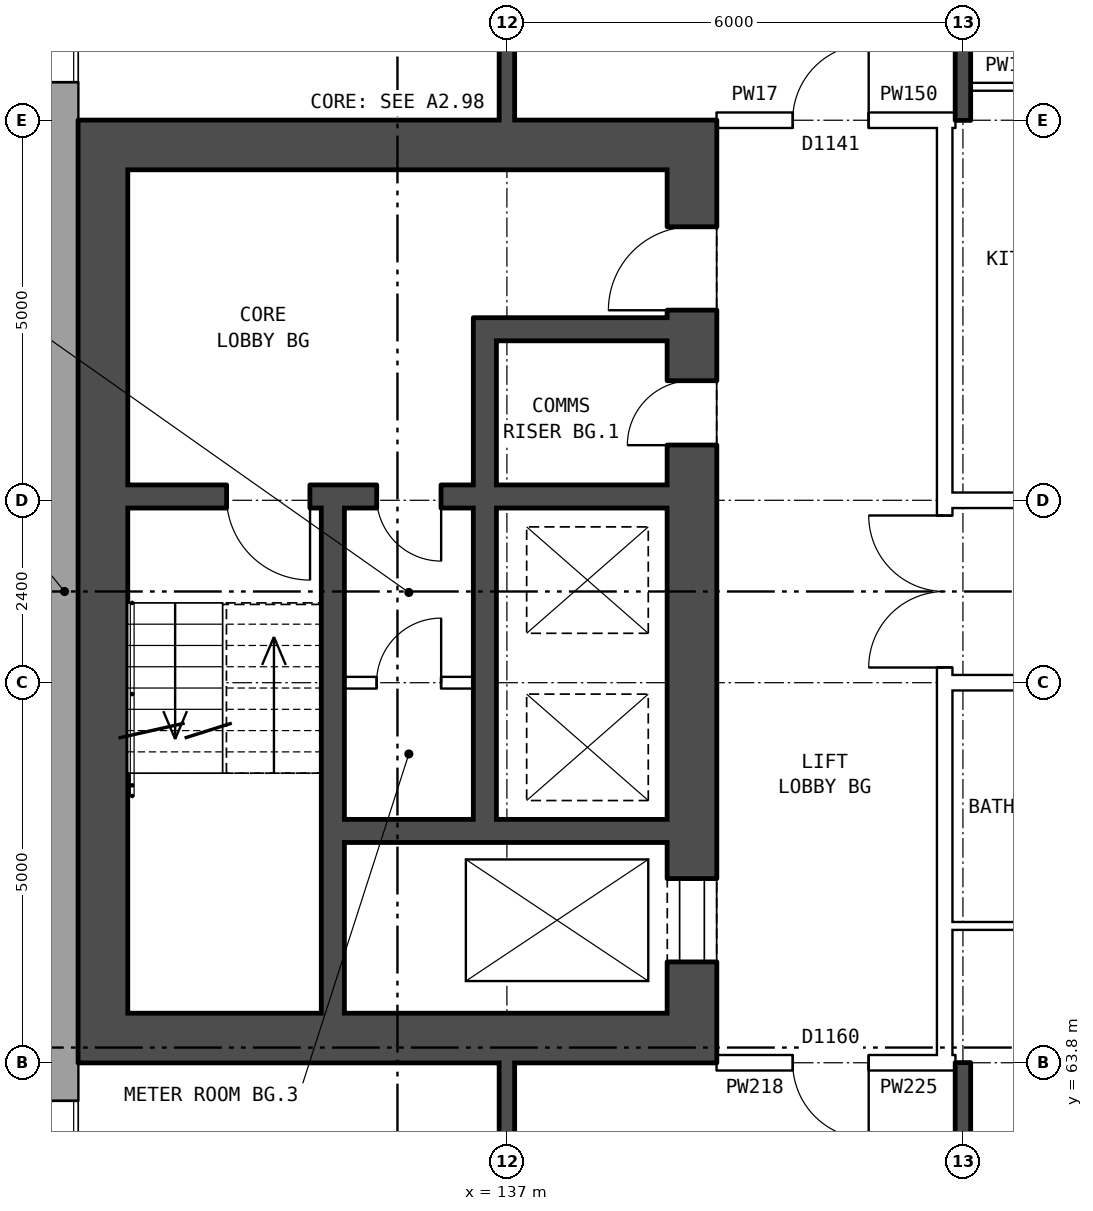
"""IFC4 building model, lengths in metres.
Left out: names, types, materials, properties, quantities, classifications, styles, units other than length and angle.
Written with IfcOpenShell. Run it as: python <this file> out.ifc"""

import sys

from ifc_helpers import new_model, si_unit, direction, frame, frame_2d, origin, place, context, subcontext, project, spatial, rectangle, extrude, element, fill, save


model = new_model("IFC4")
c1 = context("Model", 3, precision=1e-05, world=origin(), true_north=direction((0.0, 1.0)))
c2 = subcontext(c1, "Body", "Model", "MODEL_VIEW")
j1 = project(units=[si_unit("LENGTHUNIT", "METRE"), si_unit("PLANEANGLEUNIT", "RADIAN")], contexts=[c1])
p1 = place(None, origin())
s1 = spatial("IfcSite", under=j1, at=p1, CompositionType="ELEMENT")
p2 = place(p1, origin())
s2 = spatial("IfcBuilding", under=s1, at=p2, CompositionType="ELEMENT")
p3 = place(p2, frame((0.0, 0.0, 102.6)))
s3 = spatial("IfcBuildingStorey", under=s2, at=p3, CompositionType="ELEMENT", Elevation=102.6)
p4 = place(p3, frame((131.18, 82.925, 0.0), z_axis=(0.0, 0.0, 1.0), x_axis=(0.0, -1.0, 0.0)))
e1 = element("IfcWall", 1, at=p4, inside=s3, PredefinedType="STANDARD", context=c2, shape_type="SweptSolid", body=[
    extrude(rectangle(XDim=25.851, YDim=0.36, at=frame_2d((12.925, 0.0))), origin(), (0.0, 0.0, 1.0), 2.85),
])
p5 = place(p4, frame((1.625, 0.0, 0.8)))
e2 = element("IfcOpeningElement", 2, at=p5, cuts=e1, PredefinedType="OPENING", context=c2, shape_type="SweptSolid", body=[
    extrude(rectangle(XDim=1.6, YDim=1.8, at=frame_2d((0.8, 0.9))), frame((0.0, 0.19, 0.0), z_axis=(0.0, -1.0, 0.0), x_axis=(1.0, 0.0, 0.0)), (0.0, 0.0, 1.0), 0.38),
])
p6 = place(p4, frame((4.625, 0.0, 0.8)))
e3 = element("IfcOpeningElement", 3, at=p6, cuts=e1, PredefinedType="OPENING", context=c2, shape_type="SweptSolid", body=[
    extrude(rectangle(XDim=1.6, YDim=1.8, at=frame_2d((0.8, 0.9))), frame((0.0, 0.19, 0.0), z_axis=(0.0, -1.0, 0.0), x_axis=(1.0, 0.0, 0.0)), (0.0, 0.0, 1.0), 0.38),
])
p7 = place(p4, frame((19.625, 0.0, 0.8)))
e4 = element("IfcOpeningElement", 4, at=p7, cuts=e1, PredefinedType="OPENING", context=c2, shape_type="SweptSolid", body=[
    extrude(rectangle(XDim=1.6, YDim=1.8, at=frame_2d((0.8, 0.9))), frame((0.0, 0.19, 0.0), z_axis=(0.0, -1.0, 0.0), x_axis=(1.0, 0.0, 0.0)), (0.0, 0.0, 1.0), 0.38),
])
p8 = place(p4, frame((22.625, 0.0, 0.8)))
e5 = element("IfcOpeningElement", 5, at=p8, cuts=e1, PredefinedType="OPENING", context=c2, shape_type="SweptSolid", body=[
    extrude(rectangle(XDim=1.6, YDim=1.8, at=frame_2d((0.8, 0.9))), frame((0.0, 0.19, 0.0), z_axis=(0.0, -1.0, 0.0), x_axis=(1.0, 0.0, 0.0)), (0.0, 0.0, 1.0), 0.38),
])
p9 = place(p3, frame((139.435, 64.45, 0.0), z_axis=(0.0, 0.0, 1.0), x_axis=(0.0, 1.0, 0.0)))
e6 = element("IfcWall", 6, at=p9, inside=s3, PredefinedType="SHEAR", context=c2, shape_type="SweptSolid", body=[
    extrude(rectangle(XDim=11.1, YDim=0.65, at=frame_2d((5.55, 0.0))), origin(), (0.0, 0.0, 1.0), 2.85),
])
p10 = place(p9, frame((0.675, 0.0, 0.0)))
e7 = element("IfcOpeningElement", 7, at=p10, cuts=e6, PredefinedType="OPENING", context=c2, shape_type="SweptSolid", body=[
    extrude(rectangle(XDim=1.1, YDim=2.1, at=frame_2d((0.55, 1.05))), frame((0.0, 0.335, 0.0), z_axis=(0.0, -1.0, 0.0), x_axis=(1.0, 0.0, 0.0)), (0.0, 0.0, 1.0), 0.67),
])
p11 = place(p9, frame((9.25, 0.0, 0.0)))
e8 = element("IfcOpeningElement", 8, at=p11, cuts=e6, PredefinedType="OPENING", context=c2, shape_type="SweptSolid", body=[
    extrude(rectangle(XDim=1.1, YDim=2.1, at=frame_2d((0.55, 1.05))), frame((0.0, 0.335, 0.0), z_axis=(0.0, -1.0, 0.0), x_axis=(1.0, 0.0, 0.0)), (0.0, 0.0, 1.0), 0.67),
])
p12 = place(p9, frame((7.475, 0.0, 0.0)))
e9 = element("IfcOpeningElement", 9, at=p12, cuts=e6, PredefinedType="OPENING", context=c2, shape_type="SweptSolid", body=[
    extrude(rectangle(XDim=0.85, YDim=2.1, at=frame_2d((0.425, 1.05))), frame((0.0, 0.335, 0.0), z_axis=(0.0, -1.0, 0.0), x_axis=(1.0, 0.0, 0.0)), (0.0, 0.0, 1.0), 0.67),
])
p13 = place(p3, frame((131.685, 64.45, 0.0), z_axis=(0.0, 0.0, 1.0), x_axis=(0.0, 1.0, 0.0)))
e10 = element("IfcWall", 10, at=p13, inside=s3, PredefinedType="SHEAR", context=c2, shape_type="SweptSolid", body=[
    extrude(rectangle(XDim=11.1, YDim=0.65, at=frame_2d((5.55, 0.0))), origin(), (0.0, 0.0, 1.0), 2.85),
])
for number, where, z_axis, x_axis in (
    (11, (139.76, 64.125, 0.0), (0.0, 0.0, 1.0), (-1.0, 0.0, 0.0)),
    (12, (139.76, 75.875, 0.0), (0.0, 0.0, 1.0), (-1.0, 0.0, 0.0)),
):
    element("IfcWall", number, at=place(p3, frame(where, z_axis=z_axis, x_axis=x_axis)), inside=s3, PredefinedType="SHEAR", context=c2, shape_type="SweptSolid", body=[
        extrude(rectangle(XDim=8.4, YDim=0.65, at=frame_2d((4.2, 0.0))), origin(), (0.0, 0.0, 1.0), 2.85),
    ])
p14 = place(p3, frame((139.11, 66.85, 0.0), z_axis=(0.0, 0.0, 1.0), x_axis=(-1.0, 0.0, 0.0)))
e13 = element("IfcWall", 13, at=p14, inside=s3, PredefinedType="SHEAR", context=c2, shape_type="SweptSolid", body=[
    extrude(rectangle(XDim=4.25, YDim=0.3, at=frame_2d((2.125, 0.0))), origin(), (0.0, 0.0, 1.0), 2.85),
])
p15 = place(p3, frame((136.56, 68.8, 0.0), z_axis=(0.0, 0.0, 1.0), x_axis=(-1.0, 0.0, 0.0)))
e14 = element("IfcWall", 14, at=p15, inside=s3, PredefinedType="PARTITIONING", context=c2, shape_type="SweptSolid", body=[
    extrude(rectangle(XDim=1.7, YDim=0.15, at=frame_2d((0.85, 0.0))), origin(), (0.0, 0.0, 1.0), 2.85),
])
p16 = place(p15, frame((0.425, 0.0, 0.0)))
e15 = element("IfcOpeningElement", 15, at=p16, cuts=e14, PredefinedType="OPENING", context=c2, shape_type="SweptSolid", body=[
    extrude(rectangle(XDim=0.85, YDim=2.1, at=frame_2d((0.425, 1.05))), frame((0.0, 0.085, 0.0), z_axis=(0.0, -1.0, 0.0), x_axis=(1.0, 0.0, 0.0)), (0.0, 0.0, 1.0), 0.17),
])
p17 = place(p3, frame((139.11, 71.25, 0.0), z_axis=(0.0, 0.0, 1.0), x_axis=(-1.0, 0.0, 0.0)))
e16 = element("IfcWall", 16, at=p17, inside=s3, PredefinedType="SHEAR", context=c2, shape_type="SweptSolid", body=[
    extrude(rectangle(XDim=7.1, YDim=0.3, at=frame_2d((3.55, 0.0))), origin(), (0.0, 0.0, 1.0), 2.85),
])
p18 = place(p17, frame((4.7, 0.0, 0.0)))
e17 = element("IfcOpeningElement", 17, at=p18, cuts=e16, PredefinedType="OPENING", context=c2, shape_type="SweptSolid", body=[
    extrude(rectangle(XDim=1.1, YDim=2.1, at=frame_2d((0.55, 1.05))), frame((0.0, 0.16, 0.0), z_axis=(0.0, -1.0, 0.0), x_axis=(1.0, 0.0, 0.0)), (0.0, 0.0, 1.0), 0.32),
])
p19 = place(p17, frame((2.975, 0.0, 0.0)))
e18 = element("IfcOpeningElement", 18, at=p19, cuts=e16, PredefinedType="OPENING", context=c2, shape_type="SweptSolid", body=[
    extrude(rectangle(XDim=0.85, YDim=2.1, at=frame_2d((0.425, 1.05))), frame((0.0, 0.16, 0.0), z_axis=(0.0, -1.0, 0.0), x_axis=(1.0, 0.0, 0.0)), (0.0, 0.0, 1.0), 0.32),
])
p20 = place(p3, frame((139.11, 73.45, 0.0), z_axis=(0.0, 0.0, 1.0), x_axis=(-1.0, 0.0, 0.0)))
e19 = element("IfcWall", 19, at=p20, inside=s3, PredefinedType="SHEAR", context=c2, shape_type="SweptSolid", body=[
    extrude(rectangle(XDim=2.25, YDim=0.3, at=frame_2d((1.125, 0.0))), origin(), (0.0, 0.0, 1.0), 2.85),
])
p21 = place(p3, frame((136.71, 67.0, 0.0), z_axis=(0.0, 0.0, 1.0), x_axis=(0.0, 1.0, 0.0)))
e20 = element("IfcWall", 20, at=p21, inside=s3, PredefinedType="SHEAR", context=c2, shape_type="SweptSolid", body=[
    extrude(rectangle(XDim=4.1, YDim=0.3, at=frame_2d((2.05, 0.0))), origin(), (0.0, 0.0, 1.0), 2.85),
])
p22 = place(p3, frame((136.71, 71.4, 0.0), z_axis=(0.0, 0.0, 1.0), x_axis=(0.0, 1.0, 0.0)))
e21 = element("IfcWall", 21, at=p22, inside=s3, PredefinedType="SHEAR", context=c2, shape_type="SweptSolid", body=[
    extrude(rectangle(XDim=2.2, YDim=0.3, at=frame_2d((1.1, 0.0))), origin(), (0.0, 0.0, 1.0), 2.85),
])
p23 = place(p3, frame((134.71, 64.45, 0.0), z_axis=(0.0, 0.0, 1.0), x_axis=(0.0, 1.0, 0.0)))
e22 = element("IfcWall", 22, at=p23, inside=s3, PredefinedType="SHEAR", context=c2, shape_type="SweptSolid", body=[
    extrude(rectangle(XDim=6.65, YDim=0.3, at=frame_2d((3.325, 0.0))), origin(), (0.0, 0.0, 1.0), 2.85),
])
p24 = place(p3, frame((142.76, 63.9, 0.0), z_axis=(0.0, 0.0, 1.0), x_axis=(0.0, 1.0, 0.0)))
e23 = element("IfcWall", 23, at=p24, inside=s3, PredefinedType="PARTITIONING", context=c2, shape_type="SweptSolid", body=[
    extrude(rectangle(XDim=12.2, YDim=0.2, at=frame_2d((6.1, 0.0))), origin(), (0.0, 0.0, 1.0), 2.85),
])
p25 = place(p24, frame((5.1, 0.0, 0.0)))
e24 = element("IfcOpeningElement", 24, at=p25, cuts=e23, PredefinedType="OPENING", context=c2, shape_type="SweptSolid", body=[
    extrude(rectangle(XDim=2.0, YDim=2.1, at=frame_2d((1.0, 1.05))), frame((0.0, 0.11, 0.0), z_axis=(0.0, -1.0, 0.0), x_axis=(1.0, 0.0, 0.0)), (0.0, 0.0, 1.0), 0.22),
])
p26 = place(p3, frame((139.76, 63.8, 0.0), z_axis=(0.0, 0.0, 1.0), x_axis=(1.0, 0.0, 0.0)))
e25 = element("IfcWall", 25, at=p26, inside=s3, PredefinedType="PARTITIONING", context=c2, shape_type="SweptSolid", body=[
    extrude(rectangle(XDim=3.0, YDim=0.2, at=frame_2d((1.5, 0.0))), origin(), (0.0, 0.0, 1.0), 2.85),
])
p27 = place(p26, frame((1.0, 0.0, 0.0)))
e26 = element("IfcOpeningElement", 26, at=p27, cuts=e25, PredefinedType="OPENING", context=c2, shape_type="SweptSolid", body=[
    extrude(rectangle(XDim=1.0, YDim=2.1, at=frame_2d((0.5, 1.05))), frame((0.0, 0.11, 0.0), z_axis=(0.0, -1.0, 0.0), x_axis=(1.0, 0.0, 0.0)), (0.0, 0.0, 1.0), 0.22),
])
p28 = place(p3, frame((142.76, 63.8, 0.0), z_axis=(0.0, 0.0, 1.0), x_axis=(1.0, 0.0, 0.0)))
e27 = element("IfcWall", 27, at=p28, inside=s3, PredefinedType="PARTITIONING", context=c2, shape_type="SweptSolid", body=[
    extrude(rectangle(XDim=0.14, YDim=0.2, at=frame_2d((0.07, 0.0))), origin(), (0.0, 0.0, 1.0), 2.85),
])
p29 = place(p3, frame((142.76, 65.6, 0.0), z_axis=(0.0, 0.0, 1.0), x_axis=(1.0, 0.0, 0.0)))
e28 = element("IfcWall", 28, at=p29, inside=s3, PredefinedType="PARTITIONING", context=c2, shape_type="SweptSolid", body=[
    extrude(rectangle(XDim=3.24, YDim=0.1, at=frame_2d((1.62, 0.0))), origin(), (0.0, 0.0, 1.0), 2.85),
])
p30 = place(p3, frame((142.76, 68.8, 0.0), z_axis=(0.0, 0.0, 1.0), x_axis=(1.0, 0.0, 0.0)))
e29 = element("IfcWall", 29, at=p30, inside=s3, PredefinedType="PARTITIONING", context=c2, shape_type="SweptSolid", body=[
    extrude(rectangle(XDim=14.48, YDim=0.2, at=frame_2d((7.24, 0.0))), origin(), (0.0, 0.0, 1.0), 2.85),
])
p31 = place(p30, frame((4.24, 0.0, 0.0)))
e30 = element("IfcOpeningElement", 30, at=p31, cuts=e29, PredefinedType="OPENING", context=c2, shape_type="SweptSolid", body=[
    extrude(rectangle(XDim=1.0, YDim=2.1, at=frame_2d((0.5, 1.05))), frame((0.0, 0.11, 0.0), z_axis=(0.0, -1.0, 0.0), x_axis=(1.0, 0.0, 0.0)), (0.0, 0.0, 1.0), 0.22),
])
p32 = place(p30, frame((7.24, 0.0, 0.0)))
e31 = element("IfcOpeningElement", 31, at=p32, cuts=e29, PredefinedType="OPENING", context=c2, shape_type="SweptSolid", body=[
    extrude(rectangle(XDim=1.0, YDim=2.1, at=frame_2d((0.5, 1.05))), frame((0.0, 0.11, 0.0), z_axis=(0.0, -1.0, 0.0), x_axis=(1.0, 0.0, 0.0)), (0.0, 0.0, 1.0), 0.22),
])
p33 = place(p3, frame((142.76, 71.2, 0.0), z_axis=(0.0, 0.0, 1.0), x_axis=(1.0, 0.0, 0.0)))
e32 = element("IfcWall", 32, at=p33, inside=s3, PredefinedType="PARTITIONING", context=c2, shape_type="SweptSolid", body=[
    extrude(rectangle(XDim=14.48, YDim=0.2, at=frame_2d((7.24, 0.0))), origin(), (0.0, 0.0, 1.0), 2.85),
])
p34 = place(p33, frame((1.12, 0.0, 0.0)))
e33 = element("IfcOpeningElement", 33, at=p34, cuts=e32, PredefinedType="OPENING", context=c2, shape_type="SweptSolid", body=[
    extrude(rectangle(XDim=1.0, YDim=2.1, at=frame_2d((0.5, 1.05))), frame((0.0, 0.11, 0.0), z_axis=(0.0, -1.0, 0.0), x_axis=(1.0, 0.0, 0.0)), (0.0, 0.0, 1.0), 0.22),
])
p35 = place(p33, frame((10.24, 0.0, 0.0)))
e34 = element("IfcOpeningElement", 34, at=p35, cuts=e32, PredefinedType="OPENING", context=c2, shape_type="SweptSolid", body=[
    extrude(rectangle(XDim=1.0, YDim=2.1, at=frame_2d((0.5, 1.05))), frame((0.0, 0.11, 0.0), z_axis=(0.0, -1.0, 0.0), x_axis=(1.0, 0.0, 0.0)), (0.0, 0.0, 1.0), 0.22),
])
p36 = place(p3, frame((139.76, 76.2, 0.0), z_axis=(0.0, 0.0, 1.0), x_axis=(1.0, 0.0, 0.0)))
e35 = element("IfcWall", 35, at=p36, inside=s3, PredefinedType="PARTITIONING", context=c2, shape_type="SweptSolid", body=[
    extrude(rectangle(XDim=3.0, YDim=0.2, at=frame_2d((1.5, 0.0))), origin(), (0.0, 0.0, 1.0), 2.85),
])
p37 = place(p36, frame((1.0, 0.0, 0.0)))
e36 = element("IfcOpeningElement", 36, at=p37, cuts=e35, PredefinedType="OPENING", context=c2, shape_type="SweptSolid", body=[
    extrude(rectangle(XDim=1.0, YDim=2.1, at=frame_2d((0.5, 1.05))), frame((0.0, 0.11, 0.0), z_axis=(0.0, -1.0, 0.0), x_axis=(1.0, 0.0, 0.0)), (0.0, 0.0, 1.0), 0.22),
])
p38 = place(p3, frame((142.76, 76.2, 0.0), z_axis=(0.0, 0.0, 1.0), x_axis=(1.0, 0.0, 0.0)))
e37 = element("IfcWall", 37, at=p38, inside=s3, PredefinedType="PARTITIONING", context=c2, shape_type="SweptSolid", body=[
    extrude(rectangle(XDim=0.14, YDim=0.2, at=frame_2d((0.07, 0.0))), origin(), (0.0, 0.0, 1.0), 2.85),
])
p39 = place(p3, frame((143.1, 76.64, 0.0), z_axis=(0.0, 0.0, 1.0), x_axis=(1.0, 0.0, 0.0)))
e38 = element("IfcWall", 38, at=p39, inside=s3, PredefinedType="PARTITIONING", context=c2, shape_type="SweptSolid", body=[
    extrude(rectangle(XDim=2.9, YDim=0.1, at=frame_2d((1.45, 0.0))), origin(), (0.0, 0.0, 1.0), 2.85),
])
p40 = place(p39, frame((1.0, 0.0, 0.0)))
e39 = element("IfcOpeningElement", 39, at=p40, cuts=e38, PredefinedType="OPENING", context=c2, shape_type="SweptSolid", body=[
    extrude(rectangle(XDim=0.9, YDim=2.1, at=frame_2d((0.45, 1.05))), frame((0.0, 0.06, 0.0), z_axis=(0.0, -1.0, 0.0), x_axis=(1.0, 0.0, 0.0)), (0.0, 0.0, 1.0), 0.12),
])
p41 = place(p3, frame((137.0, 54.36, 0.0), z_axis=(0.0, 0.0, 1.0), x_axis=(0.0, 1.0, 0.0)))
e40 = element("IfcWall", 40, at=p41, inside=s3, PredefinedType="SOLIDWALL", context=c2, shape_type="SweptSolid", body=[
    extrude(rectangle(XDim=9.44, YDim=0.2, at=frame_2d((4.72, 0.0))), origin(), (0.0, 0.0, 1.0), 2.85),
])
p42 = place(p41, frame((1.37, 0.0, 0.0)))
e41 = element("IfcOpeningElement", 41, at=p42, cuts=e40, PredefinedType="OPENING", context=c2, shape_type="SweptSolid", body=[
    extrude(rectangle(XDim=0.9, YDim=2.1, at=frame_2d((0.45, 1.05))), frame((0.0, 0.11, 0.0), z_axis=(0.0, -1.0, 0.0), x_axis=(1.0, 0.0, 0.0)), (0.0, 0.0, 1.0), 0.22),
])
p43 = place(p41, frame((7.04, 0.0, 0.0)))
e42 = element("IfcOpeningElement", 42, at=p43, cuts=e40, PredefinedType="OPENING", context=c2, shape_type="SweptSolid", body=[
    extrude(rectangle(XDim=0.9, YDim=2.1, at=frame_2d((0.45, 1.05))), frame((0.0, 0.11, 0.0), z_axis=(0.0, -1.0, 0.0), x_axis=(1.0, 0.0, 0.0)), (0.0, 0.0, 1.0), 0.22),
])
p44 = place(p3, frame((137.0, 76.2, 0.0), z_axis=(0.0, 0.0, 1.0), x_axis=(0.0, 1.0, 0.0)))
e43 = element("IfcWall", 43, at=p44, inside=s3, PredefinedType="SOLIDWALL", context=c2, shape_type="SweptSolid", body=[
    extrude(rectangle(XDim=9.44, YDim=0.2, at=frame_2d((4.72, 0.0))), origin(), (0.0, 0.0, 1.0), 2.85),
])
p45 = place(p44, frame((1.35, 0.0, 0.0)))
e44 = element("IfcOpeningElement", 44, at=p45, cuts=e43, PredefinedType="OPENING", context=c2, shape_type="SweptSolid", body=[
    extrude(rectangle(XDim=0.9, YDim=2.1, at=frame_2d((0.45, 1.05))), frame((0.0, 0.11, 0.0), z_axis=(0.0, -1.0, 0.0), x_axis=(1.0, 0.0, 0.0)), (0.0, 0.0, 1.0), 0.22),
])
for number, where, z_axis, x_axis in (
    (45, (143.0, 54.36, 0.0), (0.0, 0.0, 1.0), (0.0, 1.0, 0.0)),
    (46, (143.0, 76.2, 0.0), (0.0, 0.0, 1.0), (0.0, 1.0, 0.0)),
):
    element("IfcWall", number, at=place(p3, frame(where, z_axis=z_axis, x_axis=x_axis)), inside=s3, PredefinedType="SOLIDWALL", context=c2, shape_type="SweptSolid", body=[
        extrude(rectangle(XDim=9.44, YDim=0.2, at=frame_2d((4.72, 0.0))), origin(), (0.0, 0.0, 1.0), 2.85),
    ])
p46 = place(p6, origin())
e47 = element("IfcWindow", 47, at=p46, inside=s3, PartitioningType="SINGLE_PANEL", PredefinedType="WINDOW", context=c2, shape_type="SweptSolid", body=[
    extrude(rectangle(XDim=1.6, YDim=1.8, at=frame_2d((0.8, 0.9))), frame((0.0, 0.15, 0.0), z_axis=(0.0, -1.0, 0.0), x_axis=(1.0, 0.0, 0.0)), (0.0, 0.0, 1.0), 0.06),
])
fill(e3, e47)
p47 = place(p7, origin())
e48 = element("IfcWindow", 48, at=p47, inside=s3, PartitioningType="SINGLE_PANEL", PredefinedType="WINDOW", context=c2, shape_type="SweptSolid", body=[
    extrude(rectangle(XDim=1.6, YDim=1.8, at=frame_2d((0.8, 0.9))), frame((0.0, 0.15, 0.0), z_axis=(0.0, -1.0, 0.0), x_axis=(1.0, 0.0, 0.0)), (0.0, 0.0, 1.0), 0.06),
])
fill(e4, e48)
p48 = place(p10, origin())
e49 = element("IfcDoor", 49, at=p48, inside=s3, OperationType="DOUBLE_DOOR_SLIDING", PredefinedType="DOOR", context=c2, shape_type="SweptSolid", body=[
    extrude(rectangle(XDim=1.1, YDim=2.1, at=frame_2d((0.55, 1.05))), frame((0.0, 0.31, 0.0), z_axis=(0.0, -1.0, 0.0), x_axis=(1.0, 0.0, 0.0)), (0.0, 0.0, 1.0), 0.05),
])
fill(e7, e49)
p49 = place(p11, origin())
e50 = element("IfcDoor", 50, at=p49, inside=s3, OperationType="SINGLE_SWING_LEFT", PredefinedType="DOOR", context=c2, shape_type="SweptSolid", body=[
    extrude(rectangle(XDim=1.1, YDim=2.1, at=frame_2d((0.55, 1.05))), frame((0.0, 0.31, 0.0), z_axis=(0.0, -1.0, 0.0), x_axis=(1.0, 0.0, 0.0)), (0.0, 0.0, 1.0), 0.05),
])
fill(e8, e50)
p50 = place(p18, origin())
e51 = element("IfcDoor", 51, at=p50, inside=s3, OperationType="SINGLE_SWING_LEFT", PredefinedType="DOOR", context=c2, shape_type="SweptSolid", body=[
    extrude(rectangle(XDim=1.1, YDim=2.1, at=frame_2d((0.55, 1.05))), frame((0.0, 0.025, 0.0), z_axis=(0.0, -1.0, 0.0), x_axis=(1.0, 0.0, 0.0)), (0.0, 0.0, 1.0), 0.05),
])
fill(e17, e51)
p51 = place(p12, origin())
e52 = element("IfcDoor", 52, at=p51, inside=s3, OperationType="SINGLE_SWING_LEFT", PredefinedType="DOOR", context=c2, shape_type="SweptSolid", body=[
    extrude(rectangle(XDim=0.85, YDim=2.1, at=frame_2d((0.425, 1.05))), frame((0.0, 0.31, 0.0), z_axis=(0.0, -1.0, 0.0), x_axis=(1.0, 0.0, 0.0)), (0.0, 0.0, 1.0), 0.05),
])
fill(e9, e52)
p52 = place(p19, origin())
e53 = element("IfcDoor", 53, at=p52, inside=s3, OperationType="SINGLE_SWING_LEFT", PredefinedType="DOOR", context=c2, shape_type="SweptSolid", body=[
    extrude(rectangle(XDim=0.85, YDim=2.1, at=frame_2d((0.425, 1.05))), frame((0.0, 0.025, 0.0), z_axis=(0.0, -1.0, 0.0), x_axis=(1.0, 0.0, 0.0)), (0.0, 0.0, 1.0), 0.05),
])
fill(e18, e53)
p53 = place(p16, frame((0.85, 0.0, 0.0), z_axis=(0.0, 0.0, 1.0), x_axis=(-1.0, 0.0, 0.0)))
e54 = element("IfcDoor", 54, at=p53, inside=s3, OperationType="SINGLE_SWING_RIGHT", PredefinedType="DOOR", context=c2, shape_type="SweptSolid", body=[
    extrude(rectangle(XDim=0.85, YDim=2.1, at=frame_2d((0.425, 1.05))), frame((0.0, 0.025, 0.0), z_axis=(0.0, -1.0, 0.0), x_axis=(1.0, 0.0, 0.0)), (0.0, 0.0, 1.0), 0.05),
])
fill(e15, e54)
p54 = place(p25, origin())
e55 = element("IfcDoor", 55, at=p54, inside=s3, OperationType="DOUBLE_DOOR_SINGLE_SWING", PredefinedType="DOOR", context=c2, shape_type="SweptSolid", body=[
    extrude(rectangle(XDim=2.0, YDim=2.1, at=frame_2d((1.0, 1.05))), frame((0.0, 0.025, 0.0), z_axis=(0.0, -1.0, 0.0), x_axis=(1.0, 0.0, 0.0)), (0.0, 0.0, 1.0), 0.05),
])
fill(e24, e55)
p55 = place(p27, frame((1.0, 0.0, 0.0), z_axis=(0.0, 0.0, 1.0), x_axis=(-1.0, 0.0, 0.0)))
e56 = element("IfcDoor", 56, at=p55, inside=s3, OperationType="SINGLE_SWING_LEFT", PredefinedType="DOOR", context=c2, shape_type="SweptSolid", body=[
    extrude(rectangle(XDim=1.0, YDim=2.1, at=frame_2d((0.5, 1.05))), frame((0.0, 0.025, 0.0), z_axis=(0.0, -1.0, 0.0), x_axis=(1.0, 0.0, 0.0)), (0.0, 0.0, 1.0), 0.05),
])
fill(e26, e56)
p56 = place(p37, origin())
e57 = element("IfcDoor", 57, at=p56, inside=s3, OperationType="SINGLE_SWING_RIGHT", PredefinedType="DOOR", context=c2, shape_type="SweptSolid", body=[
    extrude(rectangle(XDim=1.0, YDim=2.1, at=frame_2d((0.5, 1.05))), frame((0.0, 0.025, 0.0), z_axis=(0.0, -1.0, 0.0), x_axis=(1.0, 0.0, 0.0)), (0.0, 0.0, 1.0), 0.05),
])
fill(e36, e57)
save(model, sys.argv[1])
